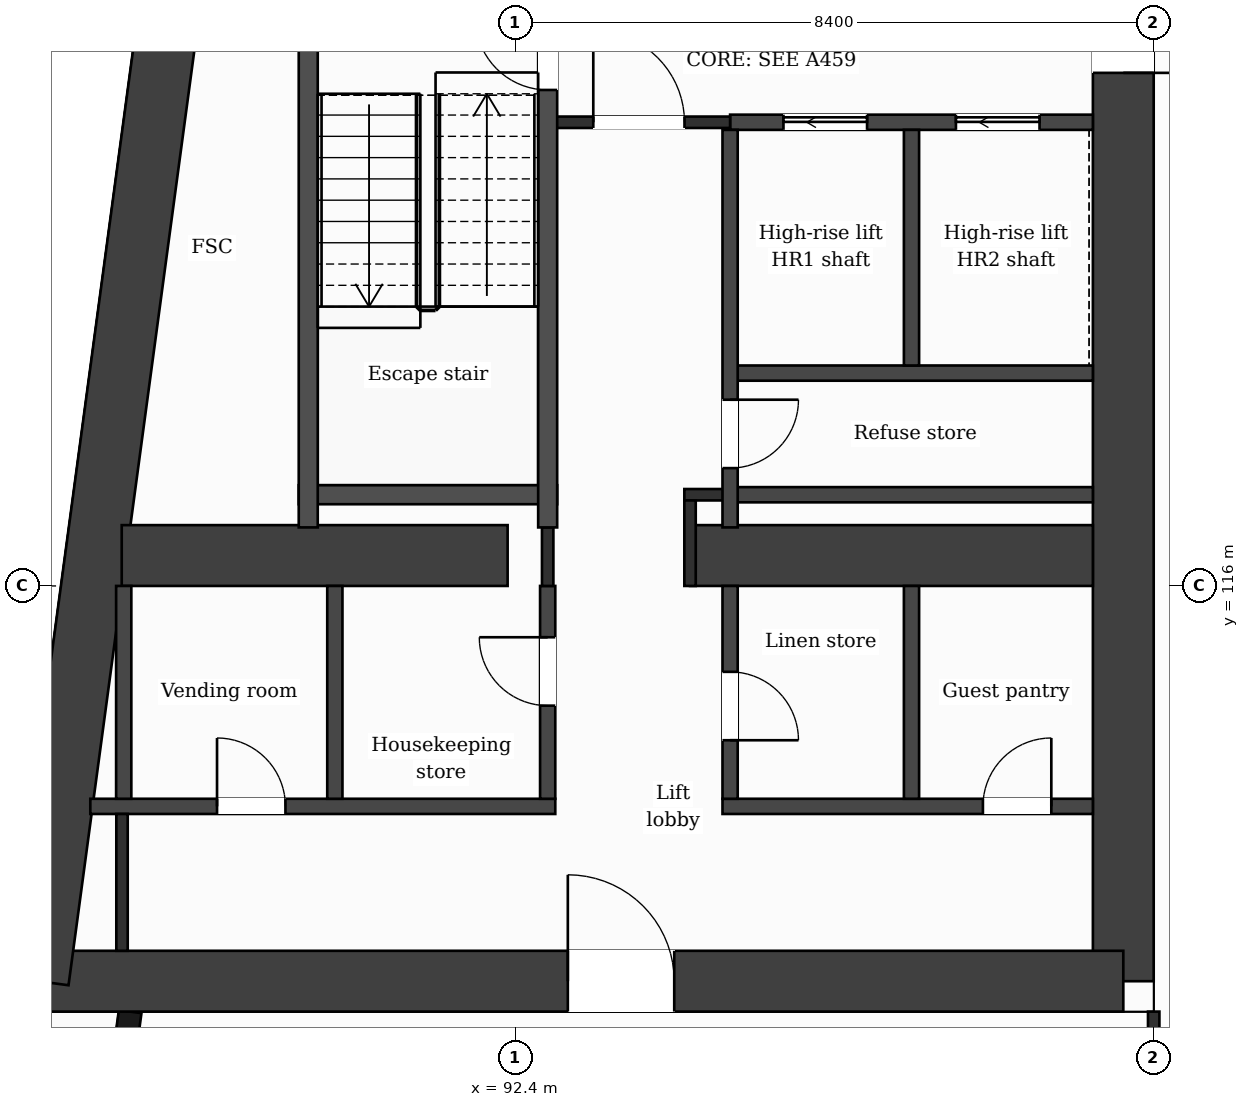
"""IFC4 building model, lengths in metres.
Left out: names, types, materials, properties, quantities, classifications, styles, units other than length and angle.
Written with IfcOpenShell. Run it as: python <this file> out.ifc"""

import sys

from ifc_helpers import new_model, si_unit, direction, frame, frame_2d, origin, place, context, subcontext, project, spatial, rectangle, extrude, element, fill, save


model = new_model("IFC4")
c1 = context("Model", 3, precision=1e-05, world=origin(), true_north=direction((0.0, 1.0)))
c2 = subcontext(c1, "Body", "Model", "MODEL_VIEW")
j1 = project(units=[si_unit("LENGTHUNIT", "METRE"), si_unit("PLANEANGLEUNIT", "RADIAN")], contexts=[c1])
p1 = place(None, origin())
s1 = spatial("IfcSite", under=j1, at=p1, CompositionType="ELEMENT")
p2 = place(p1, origin())
s2 = spatial("IfcBuilding", under=s1, at=p2, CompositionType="ELEMENT")
p3 = place(p2, frame((0.0, 0.0, 239.2)))
s3 = spatial("IfcBuildingStorey", under=s2, at=p3, CompositionType="ELEMENT", Elevation=239.2)
p4 = place(p3, frame((100.4, 132.0, 0.0), z_axis=(0.0, 0.0, 1.0), x_axis=(0.0, -1.0, 0.0)))
e1 = element("IfcWall", 1, at=p4, inside=s3, PredefinedType="SHEAR", context=c2, shape_type="SweptSolid", body=[
    extrude(rectangle(XDim=21.2, YDim=0.8, at=frame_2d((10.6, 0.0))), origin(), (0.0, 0.0, 1.0), 3.7),
])
p5 = place(p4, frame((7.85, 0.0, 0.0)))
e2 = element("IfcOpeningElement", 2, at=p5, cuts=e1, PredefinedType="OPENING", context=c2, shape_type="SweptSolid", body=[
    extrude(rectangle(XDim=1.4, YDim=2.1, at=frame_2d((0.7, 1.05))), frame((0.0, 0.41, 0.0), z_axis=(0.0, -1.0, 0.0), x_axis=(1.0, 0.0, 0.0)), (0.0, 0.0, 1.0), 0.82),
])
p6 = place(p3, frame((100.4, 110.8, 0.0), z_axis=(0.0, 0.0, 1.0), x_axis=(-1.0, 0.0, 0.0)))
e3 = element("IfcWall", 3, at=p6, inside=s3, PredefinedType="SHEAR", context=c2, shape_type="SweptSolid", body=[
    extrude(rectangle(XDim=14.273, YDim=0.8, at=frame_2d((7.137, 0.0))), origin(), (0.0, 0.0, 1.0), 3.7),
])
p7 = place(p6, frame((5.908, 0.0, 0.0)))
e4 = element("IfcOpeningElement", 4, at=p7, cuts=e3, PredefinedType="OPENING", context=c2, shape_type="SweptSolid", body=[
    extrude(rectangle(XDim=1.4, YDim=2.1, at=frame_2d((0.7, 1.05))), frame((0.0, 0.41, 0.0), z_axis=(0.0, -1.0, 0.0), x_axis=(1.0, 0.0, 0.0)), (0.0, 0.0, 1.0), 0.82),
])
p8 = place(p3, frame((86.127, 110.8, 0.0), z_axis=(0.0, 0.0, 1.0), x_axis=(0.133408347329, 0.991061154956, 0.0)))
e5 = element("IfcWall", 5, at=p8, inside=s3, PredefinedType="SHEAR", context=c2, shape_type="SweptSolid", body=[
    extrude(rectangle(XDim=21.391, YDim=0.8, at=frame_2d((10.696, 0.0))), origin(), (0.0, 0.0, 1.0), 3.7),
])
p9 = place(p3, frame((87.223, 116.4, 0.0), z_axis=(0.0, 0.0, 1.0), x_axis=(1.0, 0.0, 0.0)))
e6 = element("IfcWall", 6, at=p9, inside=s3, PredefinedType="SHEAR", context=c2, shape_type="SweptSolid", body=[
    extrude(rectangle(XDim=5.077, YDim=0.8, at=frame_2d((2.539, 0.0))), origin(), (0.0, 0.0, 1.0), 3.7),
])
p10 = place(p3, frame((94.7, 116.4, 0.0), z_axis=(0.0, 0.0, 1.0), x_axis=(1.0, 0.0, 0.0)))
e7 = element("IfcWall", 7, at=p10, inside=s3, PredefinedType="SHEAR", context=c2, shape_type="SweptSolid", body=[
    extrude(rectangle(XDim=5.3, YDim=0.8, at=frame_2d((2.65, 0.0))), origin(), (0.0, 0.0, 1.0), 3.7),
])
p11 = place(p3, frame((87.334, 110.4, 0.0), z_axis=(0.0, 0.0, 1.0), x_axis=(-0.133437175554, -0.991057273915, 0.0)))
e8 = element("IfcWall", 8, at=p11, inside=s3, PredefinedType="SOLIDWALL", context=c2, shape_type="SweptSolid", body=[
    extrude(rectangle(XDim=6.781, YDim=0.3, at=frame_2d((3.39, 0.0))), origin(), (0.0, 0.0, 1.0), 3.38),
])
p12 = place(p11, frame((1.418, 0.0, 0.0)))
e9 = element("IfcOpeningElement", 9, at=p12, cuts=e8, PredefinedType="OPENING", context=c2, shape_type="SweptSolid", body=[
    extrude(rectangle(XDim=1.2, YDim=2.4, at=frame_2d((0.6, 1.2))), frame((0.0, 0.16, 0.0), z_axis=(0.0, -1.0, 0.0), x_axis=(1.0, 0.0, 0.0)), (0.0, 0.0, 1.0), 0.32),
])
p13 = place(p11, frame((4.758, 0.0, 0.9)))
e10 = element("IfcOpeningElement", 10, at=p13, cuts=e8, PredefinedType="OPENING", context=c2, shape_type="SweptSolid", body=[
    extrude(rectangle(XDim=1.2, YDim=2.1, at=frame_2d((0.6, 1.05))), frame((0.0, 0.16, 0.0), z_axis=(0.0, -1.0, 0.0), x_axis=(1.0, 0.0, 0.0)), (0.0, 0.0, 1.0), 0.32),
])
p14 = place(p3, frame((86.81, 113.1, 0.0), z_axis=(0.0, 0.0, 1.0), x_axis=(1.0, 0.0, 0.0)))
e11 = element("IfcWall", 11, at=p14, inside=s3, PredefinedType="PARTITIONING", context=c2, shape_type="SweptSolid", body=[
    extrude(rectangle(XDim=6.117, YDim=0.2, at=frame_2d((3.059, 0.0))), origin(), (0.0, 0.0, 1.0), 3.38),
])
p15 = place(p14, frame((1.667, 0.0, 0.0)))
e12 = element("IfcOpeningElement", 12, at=p15, cuts=e11, PredefinedType="OPENING", context=c2, shape_type="SweptSolid", body=[
    extrude(rectangle(XDim=0.9, YDim=2.1, at=frame_2d((0.45, 1.05))), frame((0.0, 0.11, 0.0), z_axis=(0.0, -1.0, 0.0), x_axis=(1.0, 0.0, 0.0)), (0.0, 0.0, 1.0), 0.22),
])
p16 = place(p3, frame((95.127, 113.1, 0.0), z_axis=(0.0, 0.0, 1.0), x_axis=(1.0, 0.0, 0.0)))
e13 = element("IfcWall", 13, at=p16, inside=s3, PredefinedType="PARTITIONING", context=c2, shape_type="SweptSolid", body=[
    extrude(rectangle(XDim=4.873, YDim=0.2, at=frame_2d((2.437, 0.0))), origin(), (0.0, 0.0, 1.0), 3.38),
])
p17 = place(p16, frame((3.426, 0.0, 0.0)))
e14 = element("IfcOpeningElement", 14, at=p17, cuts=e13, PredefinedType="OPENING", context=c2, shape_type="SweptSolid", body=[
    extrude(rectangle(XDim=0.9, YDim=2.1, at=frame_2d((0.45, 1.05))), frame((0.0, 0.11, 0.0), z_axis=(0.0, -1.0, 0.0), x_axis=(1.0, 0.0, 0.0)), (0.0, 0.0, 1.0), 0.22),
])
p18 = place(p3, frame((95.227, 117.2, 0.0), z_axis=(0.0, 0.0, 1.0), x_axis=(1.0, 0.0, 0.0)))
e15 = element("IfcWall", 15, at=p18, inside=s3, PredefinedType="PARTITIONING", context=c2, shape_type="SweptSolid", body=[
    extrude(rectangle(XDim=4.773, YDim=0.2, at=frame_2d((2.386, 0.0))), origin(), (0.0, 0.0, 1.0), 3.38),
])
p19 = place(p3, frame((94.625, 117.2, 0.0), z_axis=(0.0, 0.0, 1.0), x_axis=(1.0, 0.0, 0.0)))
e16 = element("IfcWall", 16, at=p19, inside=s3, PredefinedType="PARTITIONING", context=c2, shape_type="SweptSolid", body=[
    extrude(rectangle(XDim=0.602, YDim=0.15, at=frame_2d((0.301, 0.0))), origin(), (0.0, 0.0, 1.0), 3.38),
])
p20 = place(p3, frame((89.552, 117.2, 0.0), z_axis=(0.0, 0.0, 1.0), x_axis=(1.0, 0.0, 0.0)))
e17 = element("IfcWall", 17, at=p20, inside=s3, PredefinedType="PARTITIONING", context=c2, shape_type="SweptSolid", body=[
    extrude(rectangle(XDim=3.4, YDim=0.25, at=frame_2d((1.7, 0.0))), origin(), (0.0, 0.0, 1.0), 3.38),
])
p21 = place(p3, frame((95.227, 118.8, 0.0), z_axis=(0.0, 0.0, 1.0), x_axis=(1.0, 0.0, 0.0)))
e18 = element("IfcWall", 18, at=p21, inside=s3, PredefinedType="PARTITIONING", context=c2, shape_type="SweptSolid", body=[
    extrude(rectangle(XDim=4.773, YDim=0.2, at=frame_2d((2.386, 0.0))), origin(), (0.0, 0.0, 1.0), 3.38),
])
p22 = place(p3, frame((95.227, 122.1, 0.0), z_axis=(0.0, 0.0, 1.0), x_axis=(1.0, 0.0, 0.0)))
e19 = element("IfcWall", 19, at=p22, inside=s3, PredefinedType="PARTITIONING", context=c2, shape_type="SweptSolid", body=[
    extrude(rectangle(XDim=4.773, YDim=0.2, at=frame_2d((2.386, 0.0))), origin(), (0.0, 0.0, 1.0), 3.38),
])
p23 = place(p22, frame((0.702, 0.0, 0.0)))
e20 = element("IfcOpeningElement", 20, at=p23, cuts=e19, PredefinedType="OPENING", context=c2, shape_type="SweptSolid", body=[
    extrude(rectangle(XDim=1.1, YDim=2.1, at=frame_2d((0.55, 1.05))), frame((0.0, 0.11, 0.0), z_axis=(0.0, -1.0, 0.0), x_axis=(1.0, 0.0, 0.0)), (0.0, 0.0, 1.0), 0.22),
])
p24 = place(p22, frame((2.971, 0.0, 0.0)))
e21 = element("IfcOpeningElement", 21, at=p24, cuts=e19, PredefinedType="OPENING", context=c2, shape_type="SweptSolid", body=[
    extrude(rectangle(XDim=1.1, YDim=2.1, at=frame_2d((0.55, 1.05))), frame((0.0, 0.11, 0.0), z_axis=(0.0, -1.0, 0.0), x_axis=(1.0, 0.0, 0.0)), (0.0, 0.0, 1.0), 0.22),
])
p25 = place(p3, frame((92.827, 122.1, 0.0), z_axis=(0.0, 0.0, 1.0), x_axis=(1.0, 0.0, 0.0)))
e22 = element("IfcWall", 22, at=p25, inside=s3, PredefinedType="PARTITIONING", context=c2, shape_type="SweptSolid", body=[
    extrude(rectangle(XDim=2.4, YDim=0.15, at=frame_2d((1.2, 0.0))), origin(), (0.0, 0.0, 1.0), 3.38),
])
p26 = place(p25, frame((0.6, 0.0, 0.0)))
e23 = element("IfcOpeningElement", 23, at=p26, cuts=e22, PredefinedType="OPENING", context=c2, shape_type="SweptSolid", body=[
    extrude(rectangle(XDim=1.2, YDim=2.1, at=frame_2d((0.6, 1.05))), frame((0.0, 0.085, 0.0), z_axis=(0.0, -1.0, 0.0), x_axis=(1.0, 0.0, 0.0)), (0.0, 0.0, 1.0), 0.17),
])
p27 = place(p3, frame((87.25, 113.2, 0.0), z_axis=(0.0, 0.0, 1.0), x_axis=(0.0, 1.0, 0.0)))
e24 = element("IfcWall", 24, at=p27, inside=s3, PredefinedType="PARTITIONING", context=c2, shape_type="SweptSolid", body=[
    extrude(rectangle(XDim=2.8, YDim=0.2, at=frame_2d((1.4, 0.0))), origin(), (0.0, 0.0, 1.0), 3.38),
])
p28 = place(p3, frame((87.227, 111.2, 0.0), z_axis=(0.0, 0.0, 1.0), x_axis=(0.0, 1.0, 0.0)))
e25 = element("IfcWall", 25, at=p28, inside=s3, PredefinedType="PARTITIONING", context=c2, shape_type="SweptSolid", body=[
    extrude(rectangle(XDim=1.8, YDim=0.15, at=frame_2d((0.9, 0.0))), origin(), (0.0, 0.0, 1.0), 3.38),
])
p29 = place(p3, frame((89.677, 116.77, 0.0), z_axis=(0.0, 0.0, 1.0), x_axis=(0.0, 1.0, 0.0)))
e26 = element("IfcWall", 26, at=p29, inside=s3, PredefinedType="PARTITIONING", context=c2, shape_type="SweptSolid", body=[
    extrude(rectangle(XDim=7.055, YDim=0.25, at=frame_2d((3.527, 0.0))), origin(), (0.0, 0.0, 1.0), 3.38),
])
p30 = place(p3, frame((90.027, 113.2, 0.0), z_axis=(0.0, 0.0, 1.0), x_axis=(0.0, 1.0, 0.0)))
e27 = element("IfcWall", 27, at=p30, inside=s3, PredefinedType="PARTITIONING", context=c2, shape_type="SweptSolid", body=[
    extrude(rectangle(XDim=2.8, YDim=0.2, at=frame_2d((1.4, 0.0))), origin(), (0.0, 0.0, 1.0), 3.38),
])
p31 = place(p3, frame((92.827, 113.2, 0.0), z_axis=(0.0, 0.0, 1.0), x_axis=(0.0, 1.0, 0.0)))
e28 = element("IfcWall", 28, at=p31, inside=s3, PredefinedType="PARTITIONING", context=c2, shape_type="SweptSolid", body=[
    extrude(rectangle(XDim=2.8, YDim=0.2, at=frame_2d((1.4, 0.0))), origin(), (0.0, 0.0, 1.0), 3.38),
])
p32 = place(p31, frame((1.225, 0.0, 0.0)))
e29 = element("IfcOpeningElement", 29, at=p32, cuts=e28, PredefinedType="OPENING", context=c2, shape_type="SweptSolid", body=[
    extrude(rectangle(XDim=0.9, YDim=2.1, at=frame_2d((0.45, 1.05))), frame((0.0, 0.11, 0.0), z_axis=(0.0, -1.0, 0.0), x_axis=(1.0, 0.0, 0.0)), (0.0, 0.0, 1.0), 0.22),
])
p33 = place(p3, frame((92.827, 116.0, 0.0), z_axis=(0.0, 0.0, 1.0), x_axis=(0.0, 1.0, 0.0)))
e30 = element("IfcWall", 30, at=p33, inside=s3, PredefinedType="PARTITIONING", context=c2, shape_type="SweptSolid", body=[
    extrude(rectangle(XDim=0.77, YDim=0.15, at=frame_2d((0.385, 0.0))), origin(), (0.0, 0.0, 1.0), 3.38),
])
p34 = place(p3, frame((92.827, 116.77, 0.0), z_axis=(0.0, 0.0, 1.0), x_axis=(0.0, 1.0, 0.0)))
e31 = element("IfcWall", 31, at=p34, inside=s3, PredefinedType="PARTITIONING", context=c2, shape_type="SweptSolid", body=[
    extrude(rectangle(XDim=7.055, YDim=0.25, at=frame_2d((3.527, 0.0))), origin(), (0.0, 0.0, 1.0), 3.38),
])
p35 = place(p34, frame((5.755, 0.0, 0.0)))
e32 = element("IfcOpeningElement", 32, at=p35, cuts=e31, PredefinedType="OPENING", context=c2, shape_type="SweptSolid", body=[
    extrude(rectangle(XDim=0.95, YDim=2.1, at=frame_2d((0.475, 1.05))), frame((0.0, 0.135, 0.0), z_axis=(0.0, -1.0, 0.0), x_axis=(1.0, 0.0, 0.0)), (0.0, 0.0, 1.0), 0.27),
])
p36 = place(p3, frame((94.7, 116.0, 0.0), z_axis=(0.0, 0.0, 1.0), x_axis=(0.0, 1.0, 0.0)))
e33 = element("IfcWall", 33, at=p36, inside=s3, PredefinedType="PARTITIONING", context=c2, shape_type="SweptSolid", body=[
    extrude(rectangle(XDim=1.125, YDim=0.15, at=frame_2d((0.562, 0.0))), origin(), (0.0, 0.0, 1.0), 3.38),
])
p37 = place(p3, frame((95.227, 113.2, 0.0), z_axis=(0.0, 0.0, 1.0), x_axis=(0.0, 1.0, 0.0)))
e34 = element("IfcWall", 34, at=p37, inside=s3, PredefinedType="PARTITIONING", context=c2, shape_type="SweptSolid", body=[
    extrude(rectangle(XDim=2.8, YDim=0.2, at=frame_2d((1.4, 0.0))), origin(), (0.0, 0.0, 1.0), 3.38),
])
p38 = place(p37, frame((0.77, 0.0, 0.0)))
e35 = element("IfcOpeningElement", 35, at=p38, cuts=e34, PredefinedType="OPENING", context=c2, shape_type="SweptSolid", body=[
    extrude(rectangle(XDim=0.9, YDim=2.1, at=frame_2d((0.45, 1.05))), frame((0.0, 0.11, 0.0), z_axis=(0.0, -1.0, 0.0), x_axis=(1.0, 0.0, 0.0)), (0.0, 0.0, 1.0), 0.22),
])
p39 = place(p3, frame((95.227, 116.77, 0.0), z_axis=(0.0, 0.0, 1.0), x_axis=(0.0, 1.0, 0.0)))
e36 = element("IfcWall", 36, at=p39, inside=s3, PredefinedType="PARTITIONING", context=c2, shape_type="SweptSolid", body=[
    extrude(rectangle(XDim=5.23, YDim=0.2, at=frame_2d((2.615, 0.0))), origin(), (0.0, 0.0, 1.0), 3.38),
])
p40 = place(p39, frame((0.78, 0.0, 0.0)))
e37 = element("IfcOpeningElement", 37, at=p40, cuts=e36, PredefinedType="OPENING", context=c2, shape_type="SweptSolid", body=[
    extrude(rectangle(XDim=0.9, YDim=2.1, at=frame_2d((0.45, 1.05))), frame((0.0, 0.11, 0.0), z_axis=(0.0, -1.0, 0.0), x_axis=(1.0, 0.0, 0.0)), (0.0, 0.0, 1.0), 0.22),
])
p41 = place(p3, frame((97.614, 113.2, 0.0), z_axis=(0.0, 0.0, 1.0), x_axis=(0.0, 1.0, 0.0)))
e38 = element("IfcWall", 38, at=p41, inside=s3, PredefinedType="PARTITIONING", context=c2, shape_type="SweptSolid", body=[
    extrude(rectangle(XDim=2.8, YDim=0.2, at=frame_2d((1.4, 0.0))), origin(), (0.0, 0.0, 1.0), 3.38),
])
p42 = place(p3, frame((97.614, 118.9, 0.0), z_axis=(0.0, 0.0, 1.0), x_axis=(0.0, 1.0, 0.0)))
e39 = element("IfcWall", 39, at=p42, inside=s3, PredefinedType="PARTITIONING", context=c2, shape_type="SweptSolid", body=[
    extrude(rectangle(XDim=3.1, YDim=0.2, at=frame_2d((1.55, 0.0))), origin(), (0.0, 0.0, 1.0), 3.38),
])
p43 = place(p3, frame((100.8, 109.075, 0.0), z_axis=(0.0, 0.0, 1.0), x_axis=(0.0, 1.0, 0.0)))
e40 = element("IfcWall", 40, at=p43, inside=s3, PredefinedType="PARTITIONING", context=c2, shape_type="SweptSolid", body=[
    extrude(rectangle(XDim=1.325, YDim=0.15, at=frame_2d((0.663, 0.0))), origin(), (0.0, 0.0, 1.0), 3.38),
])
p44 = place(p26, origin())
e41 = element("IfcDoor", 41, at=p44, inside=s3, OperationType="SINGLE_SWING_LEFT", PredefinedType="DOOR", context=c2, shape_type="SweptSolid", body=[
    extrude(rectangle(XDim=1.2, YDim=2.1, at=frame_2d((0.6, 1.05))), frame((0.0, 0.025, 0.0), z_axis=(0.0, -1.0, 0.0), x_axis=(1.0, 0.0, 0.0)), (0.0, 0.0, 1.0), 0.05),
])
fill(e23, e41)
p45 = place(p23, origin())
e42 = element("IfcDoor", 42, at=p45, inside=s3, OperationType="SLIDING_TO_LEFT", PredefinedType="DOOR", context=c2, shape_type="SweptSolid", body=[
    extrude(rectangle(XDim=1.1, YDim=2.1, at=frame_2d((0.55, 1.05))), frame((0.0, 0.025, 0.0), z_axis=(0.0, -1.0, 0.0), x_axis=(1.0, 0.0, 0.0)), (0.0, 0.0, 1.0), 0.05),
])
fill(e20, e42)
p46 = place(p24, origin())
e43 = element("IfcDoor", 43, at=p46, inside=s3, OperationType="SLIDING_TO_LEFT", PredefinedType="DOOR", context=c2, shape_type="SweptSolid", body=[
    extrude(rectangle(XDim=1.1, YDim=2.1, at=frame_2d((0.55, 1.05))), frame((0.0, 0.025, 0.0), z_axis=(0.0, -1.0, 0.0), x_axis=(1.0, 0.0, 0.0)), (0.0, 0.0, 1.0), 0.05),
])
fill(e21, e43)
p47 = place(p35, origin())
e44 = element("IfcDoor", 44, at=p47, inside=s3, OperationType="SINGLE_SWING_RIGHT", PredefinedType="DOOR", context=c2, shape_type="SweptSolid", body=[
    extrude(rectangle(XDim=0.95, YDim=2.1, at=frame_2d((0.475, 1.05))), frame((0.0, 0.025, 0.0), z_axis=(0.0, -1.0, 0.0), x_axis=(1.0, 0.0, 0.0)), (0.0, 0.0, 1.0), 0.05),
])
fill(e32, e44)
p48 = place(p40, origin())
e45 = element("IfcDoor", 45, at=p48, inside=s3, OperationType="SINGLE_SWING_RIGHT", PredefinedType="DOOR", context=c2, shape_type="SweptSolid", body=[
    extrude(rectangle(XDim=0.9, YDim=2.1, at=frame_2d((0.45, 1.05))), frame((0.0, 0.025, 0.0), z_axis=(0.0, -1.0, 0.0), x_axis=(1.0, 0.0, 0.0)), (0.0, 0.0, 1.0), 0.05),
])
fill(e37, e45)
p49 = place(p15, origin())
e46 = element("IfcDoor", 46, at=p49, inside=s3, OperationType="SINGLE_SWING_LEFT", PredefinedType="DOOR", context=c2, shape_type="SweptSolid", body=[
    extrude(rectangle(XDim=0.9, YDim=2.1, at=frame_2d((0.45, 1.05))), frame((0.0, 0.025, 0.0), z_axis=(0.0, -1.0, 0.0), x_axis=(1.0, 0.0, 0.0)), (0.0, 0.0, 1.0), 0.05),
])
fill(e12, e46)
p50 = place(p32, origin())
e47 = element("IfcDoor", 47, at=p50, inside=s3, OperationType="SINGLE_SWING_RIGHT", PredefinedType="DOOR", context=c2, shape_type="SweptSolid", body=[
    extrude(rectangle(XDim=0.9, YDim=2.1, at=frame_2d((0.45, 1.05))), frame((0.0, 0.025, 0.0), z_axis=(0.0, -1.0, 0.0), x_axis=(1.0, 0.0, 0.0)), (0.0, 0.0, 1.0), 0.05),
])
fill(e29, e47)
p51 = place(p38, origin())
e48 = element("IfcDoor", 48, at=p51, inside=s3, OperationType="SINGLE_SWING_LEFT", PredefinedType="DOOR", context=c2, shape_type="SweptSolid", body=[
    extrude(rectangle(XDim=0.9, YDim=2.1, at=frame_2d((0.45, 1.05))), frame((0.0, 0.025, 0.0), z_axis=(0.0, -1.0, 0.0), x_axis=(1.0, 0.0, 0.0)), (0.0, 0.0, 1.0), 0.05),
])
fill(e35, e48)
p52 = place(p17, origin())
e49 = element("IfcDoor", 49, at=p52, inside=s3, OperationType="SINGLE_SWING_RIGHT", PredefinedType="DOOR", context=c2, shape_type="SweptSolid", body=[
    extrude(rectangle(XDim=0.9, YDim=2.1, at=frame_2d((0.45, 1.05))), frame((0.0, 0.025, 0.0), z_axis=(0.0, -1.0, 0.0), x_axis=(1.0, 0.0, 0.0)), (0.0, 0.0, 1.0), 0.05),
])
fill(e14, e49)
p53 = place(p7, origin())
e50 = element("IfcDoor", 50, at=p53, inside=s3, OperationType="SINGLE_SWING_RIGHT", PredefinedType="DOOR", context=c2, shape_type="SweptSolid", body=[
    extrude(rectangle(XDim=1.4, YDim=2.1, at=frame_2d((0.7, 1.05))), frame((0.0, 0.025, 0.0), z_axis=(0.0, -1.0, 0.0), x_axis=(1.0, 0.0, 0.0)), (0.0, 0.0, 1.0), 0.05),
])
fill(e4, e50)
p54 = place(p5, origin())
e51 = element("IfcDoor", 51, at=p54, inside=s3, OperationType="SINGLE_SWING_RIGHT", PredefinedType="DOOR", context=c2, shape_type="SweptSolid", body=[
    extrude(rectangle(XDim=1.4, YDim=2.1, at=frame_2d((0.7, 1.05))), frame((0.0, 0.025, 0.0), z_axis=(0.0, -1.0, 0.0), x_axis=(1.0, 0.0, 0.0)), (0.0, 0.0, 1.0), 0.05),
])
fill(e2, e51)
save(model, sys.argv[1])
